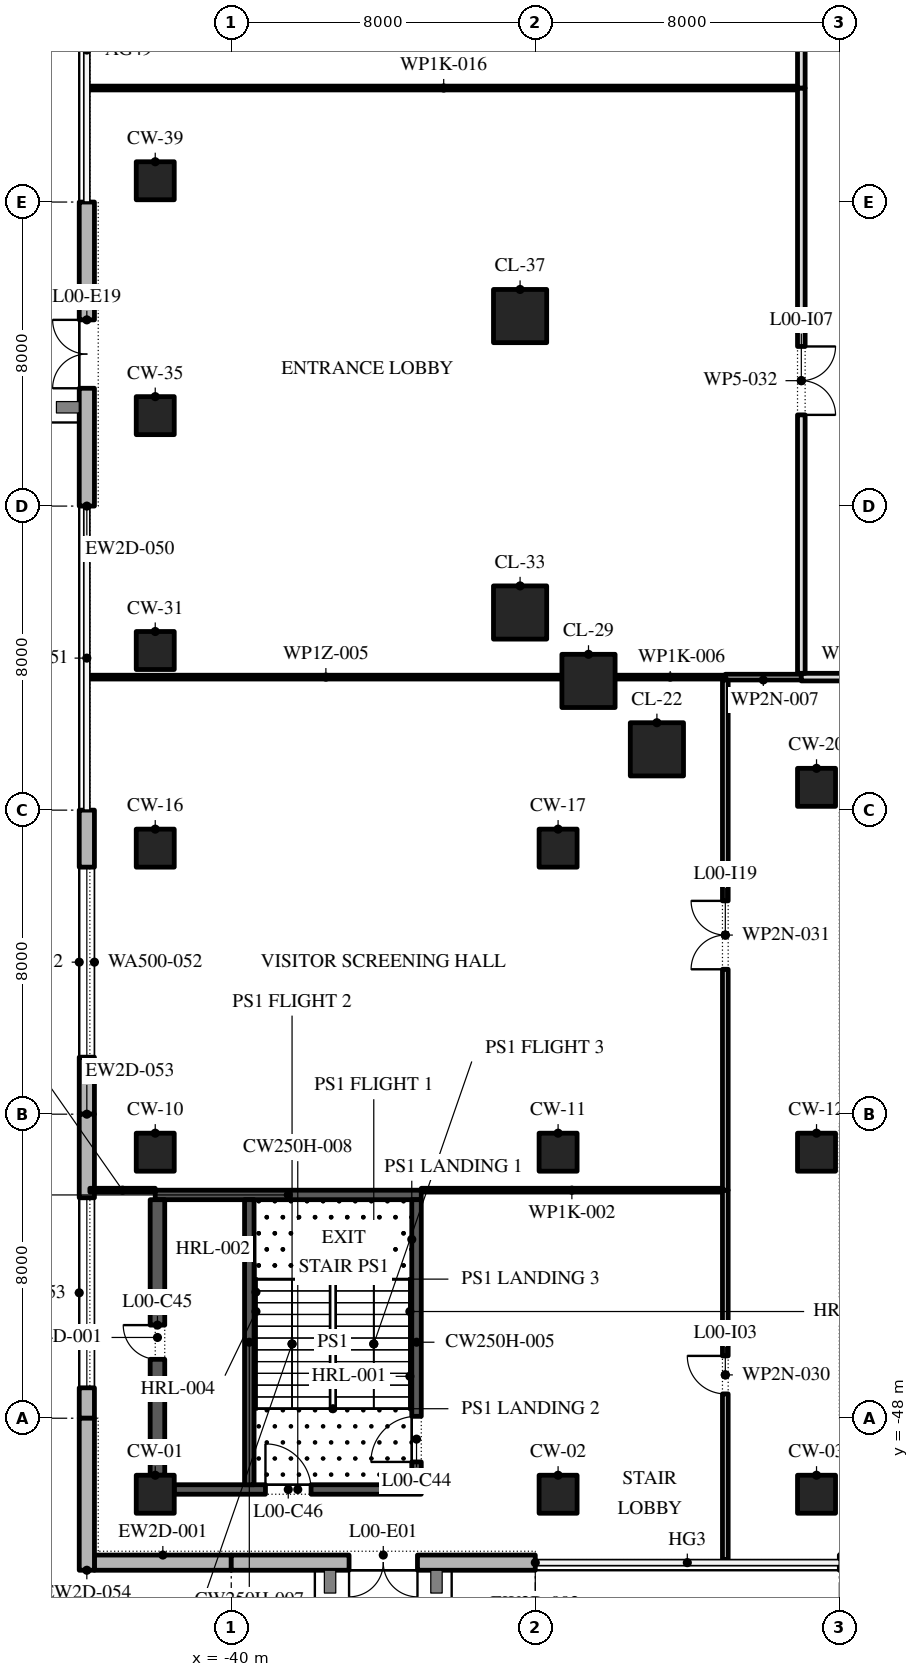
"""IFC4 building model, lengths in metres.
Left out: names, types, materials, properties, quantities, classifications, styles, units other than length and angle.
Written with IfcOpenShell. Run it as: python <this file> out.ifc"""

import sys

from ifc_helpers import new_model, si_unit, direction, frame, frame_2d, origin, origin_2d, place, context, subcontext, project, spatial, polyline, rectangle, outline, extrude, element, fill, save


model = new_model("IFC4")
c1 = context("Model", 3, precision=1e-05, world=origin(), true_north=direction((0.0, 1.0)))
c2 = subcontext(c1, "Body", "Model", "MODEL_VIEW")
j1 = project(units=[si_unit("LENGTHUNIT", "METRE"), si_unit("PLANEANGLEUNIT", "RADIAN")], contexts=[c1])
p1 = place(None, origin())
s1 = spatial("IfcSite", under=j1, at=p1, CompositionType="ELEMENT")
p2 = place(p1, origin())
s2 = spatial("IfcBuilding", under=s1, at=p2, CompositionType="ELEMENT")
p3 = place(p2, origin())
s3 = spatial("IfcBuildingStorey", under=s2, at=p3, CompositionType="ELEMENT", Elevation=0.0)
for number, where, z_axis, x_axis in (
    (1, (-42.0, -50.0, 0.0), (0.0, 0.0, 1.0), (1.0, 0.0, 0.0)),
    (2, (-31.4, -50.0, 0.0), (0.0, 0.0, 1.0), (1.0, 0.0, 0.0)),
    (3, (-24.6, -50.0, 0.0), (0.0, 0.0, 1.0), (1.0, 0.0, 0.0)),
    (4, (-42.0, -41.0, 0.0), (0.0, 0.0, 1.0), (1.0, 0.0, 0.0)),
    (5, (-31.4, -41.0, 0.0), (0.0, 0.0, 1.0), (1.0, 0.0, 0.0)),
    (6, (-24.6, -41.0, 0.0), (0.0, 0.0, 1.0), (1.0, 0.0, 0.0)),
    (7, (-42.0, -33.0, 0.0), (0.0, 0.0, 1.0), (1.0, 0.0, 0.0)),
    (8, (-31.4, -33.0, 0.0), (0.0, 0.0, 1.0), (1.0, 0.0, 0.0)),
    (9, (-24.6, -31.4, 0.0), (0.0, 0.0, 1.0), (1.0, 0.0, 0.0)),
):
    element("IfcColumn", number, at=place(p3, frame(where, z_axis=z_axis, x_axis=x_axis)), inside=s3, PredefinedType="COLUMN", context=c2, shape_type="SweptSolid", body=[
        extrude(rectangle(XDim=1.0, YDim=1.0, at=origin_2d()), origin(), (0.0, 0.0, 1.0), 8.0),
    ])
for number, where, z_axis, x_axis in (
    (10, (-28.8, -30.4, 0.0), (0.0, 0.0, 1.0), (1.0, 0.0, 0.0)),
    (11, (-30.6, -28.6, 0.0), (0.0, 0.0, 1.0), (1.0, 0.0, 0.0)),
):
    element("IfcColumn", number, at=place(p3, frame(where, z_axis=z_axis, x_axis=x_axis)), inside=s3, PredefinedType="COLUMN", context=c2, shape_type="SweptSolid", body=[
        extrude(rectangle(XDim=1.4, YDim=1.4, at=origin_2d()), origin(), (0.0, 0.0, 1.0), 8.0),
    ])
p4 = place(p3, frame((-42.0, -27.8, 0.0), z_axis=(0.0, 0.0, 1.0), x_axis=(1.0, 0.0, 0.0)))
e12 = element("IfcColumn", 12, at=p4, inside=s3, PredefinedType="COLUMN", context=c2, shape_type="SweptSolid", body=[
    extrude(rectangle(XDim=1.0, YDim=1.0, at=origin_2d()), origin(), (0.0, 0.0, 1.0), 8.0),
])
p5 = place(p3, frame((-32.4, -26.8, 0.0), z_axis=(0.0, 0.0, 1.0), x_axis=(1.0, 0.0, 0.0)))
e13 = element("IfcColumn", 13, at=p5, inside=s3, PredefinedType="COLUMN", context=c2, shape_type="SweptSolid", body=[
    extrude(rectangle(XDim=1.4, YDim=1.4, at=origin_2d()), origin(), (0.0, 0.0, 1.0), 8.0),
])
p6 = place(p3, frame((-42.0, -21.62, 0.0), z_axis=(0.0, 0.0, 1.0), x_axis=(1.0, 0.0, 0.0)))
e14 = element("IfcColumn", 14, at=p6, inside=s3, PredefinedType="COLUMN", context=c2, shape_type="SweptSolid", body=[
    extrude(rectangle(XDim=1.0, YDim=1.0, at=origin_2d()), origin(), (0.0, 0.0, 1.0), 8.0),
])
p7 = place(p3, frame((-32.4, -19.0, 0.0), z_axis=(0.0, 0.0, 1.0), x_axis=(1.0, 0.0, 0.0)))
e15 = element("IfcColumn", 15, at=p7, inside=s3, PredefinedType="COLUMN", context=c2, shape_type="SweptSolid", body=[
    extrude(rectangle(XDim=1.4, YDim=1.4, at=origin_2d()), origin(), (0.0, 0.0, 1.0), 8.0),
])
p8 = place(p3, frame((-42.0, -15.44, 0.0), z_axis=(0.0, 0.0, 1.0), x_axis=(1.0, 0.0, 0.0)))
e16 = element("IfcColumn", 16, at=p8, inside=s3, PredefinedType="COLUMN", context=c2, shape_type="SweptSolid", body=[
    extrude(rectangle(XDim=1.0, YDim=1.0, at=origin_2d()), origin(), (0.0, 0.0, 1.0), 8.0),
])
p9 = place(p3, frame((-43.6, -51.8, 0.0), z_axis=(0.0, 0.0, 1.0), x_axis=(1.0, 0.0, 0.0)))
e17 = element("IfcWall", 17, at=p9, inside=s3, PredefinedType="STANDARD", context=c2, shape_type="SweptSolid", body=[
    extrude(rectangle(XDim=3.6, YDim=0.4, at=frame_2d((1.8, 0.0))), origin(), (0.0, 0.0, 1.0), 7.7),
])
p10 = place(p3, frame((-40.0, -51.8, 0.0), z_axis=(0.0, 0.0, 1.0), x_axis=(1.0, 0.0, 0.0)))
e18 = element("IfcWall", 18, at=p10, inside=s3, PredefinedType="STANDARD", context=c2, shape_type="SweptSolid", body=[
    extrude(rectangle(XDim=8.0, YDim=0.4, at=frame_2d((4.0, 0.0))), origin(), (0.0, 0.0, 1.0), 7.7),
])
p11 = place(p10, frame((3.1, 0.0, 0.0)))
e19 = element("IfcOpeningElement", 19, at=p11, cuts=e18, PredefinedType="OPENING", context=c2, shape_type="SweptSolid", body=[
    extrude(rectangle(XDim=1.8, YDim=2.7, at=frame_2d((0.9, 1.35))), frame((0.0, 0.21, 0.0), z_axis=(0.0, -1.0, 0.0), x_axis=(1.0, 0.0, 0.0)), (0.0, 0.0, 1.0), 0.42),
])
p12 = place(p3, frame((-43.8, -16.0, 0.0), z_axis=(0.0, 0.0, 1.0), x_axis=(0.0, -1.0, 0.0)))
e20 = element("IfcWall", 20, at=p12, inside=s3, PredefinedType="STANDARD", context=c2, shape_type="SweptSolid", body=[
    extrude(rectangle(XDim=8.0, YDim=0.4, at=frame_2d((4.0, 0.0))), origin(), (0.0, 0.0, 1.0), 7.7),
])
p13 = place(p12, frame((3.1, 0.0, 0.0)))
e21 = element("IfcOpeningElement", 21, at=p13, cuts=e20, PredefinedType="OPENING", context=c2, shape_type="SweptSolid", body=[
    extrude(rectangle(XDim=1.8, YDim=2.7, at=frame_2d((0.9, 1.35))), frame((0.0, 0.21, 0.0), z_axis=(0.0, -1.0, 0.0), x_axis=(1.0, 0.0, 0.0)), (0.0, 0.0, 1.0), 0.42),
])
p14 = place(p3, frame((-43.8, -32.0, 0.0), z_axis=(0.0, 0.0, 1.0), x_axis=(0.0, -1.0, 0.0)))
e22 = element("IfcWall", 22, at=p14, inside=s3, PredefinedType="STANDARD", context=c2, shape_type="SweptSolid", body=[
    extrude(rectangle(XDim=8.0, YDim=0.4, at=frame_2d((4.0, 0.0))), origin(), (0.0, 0.0, 1.0), 7.7),
])
p15 = place(p14, frame((1.5, 0.0, 0.5)))
e23 = element("IfcOpeningElement", 23, at=p15, cuts=e22, PredefinedType="OPENING", context=c2, shape_type="SweptSolid", body=[
    extrude(outline(polyline([(0.0, 0.0), (5.0, 0.0), (5.0, 3.35), (4.955, 3.907), (4.822, 4.451), (4.604, 4.966), (4.306, 5.44), (3.937, 5.86), (3.505, 6.216), (3.022, 6.498), (2.5, 6.7), (1.978, 6.498), (1.495, 6.216), (1.063, 5.86), (0.694, 5.44), (0.396, 4.966), (0.178, 4.451), (0.045, 3.907), (0.0, 3.35), (0.0, 0.0)])), frame((0.0, 0.21, 0.0), z_axis=(0.0, -1.0, 0.0), x_axis=(1.0, 0.0, 0.0)), (0.0, 0.0, 1.0), 0.42),
])
p16 = place(p3, frame((-43.8, -40.0, 0.0), z_axis=(0.0, 0.0, 1.0), x_axis=(0.0, -1.0, 0.0)))
e24 = element("IfcWall", 24, at=p16, inside=s3, PredefinedType="STANDARD", context=c2, shape_type="SweptSolid", body=[
    extrude(rectangle(XDim=8.0, YDim=0.4, at=frame_2d((4.0, 0.0))), origin(), (0.0, 0.0, 1.0), 7.7),
])
p17 = place(p16, frame((2.2, 0.0, 0.5)))
e25 = element("IfcOpeningElement", 25, at=p17, cuts=e24, PredefinedType="OPENING", context=c2, shape_type="SweptSolid", body=[
    extrude(outline(polyline([(0.0, 0.0), (5.0, 0.0), (5.0, 3.35), (4.955, 3.907), (4.822, 4.451), (4.604, 4.966), (4.306, 5.44), (3.937, 5.86), (3.505, 6.216), (3.022, 6.498), (2.5, 6.7), (1.978, 6.498), (1.495, 6.216), (1.063, 5.86), (0.694, 5.44), (0.396, 4.966), (0.178, 4.451), (0.045, 3.907), (0.0, 3.35), (0.0, 0.0)])), frame((0.0, 0.21, 0.0), z_axis=(0.0, -1.0, 0.0), x_axis=(1.0, 0.0, 0.0)), (0.0, 0.0, 1.0), 0.42),
])
p18 = place(p3, frame((-43.8, -48.0, 0.0), z_axis=(0.0, 0.0, 1.0), x_axis=(0.0, -1.0, 0.0)))
e26 = element("IfcWall", 26, at=p18, inside=s3, PredefinedType="STANDARD", context=c2, shape_type="SweptSolid", body=[
    extrude(rectangle(XDim=4.0, YDim=0.4, at=frame_2d((2.0, 0.0))), origin(), (0.0, 0.0, 1.0), 7.7),
])
p19 = place(p3, frame((-41.5, -49.875, 0.0), z_axis=(0.0, 0.0, 1.0), x_axis=(1.0, 0.0, 0.0)))
e27 = element("IfcWall", 27, at=p19, inside=s3, PredefinedType="SHEAR", context=c2, shape_type="SweptSolid", body=[
    extrude(rectangle(XDim=6.5, YDim=0.25, at=frame_2d((3.25, 0.0))), origin(), (0.0, 0.0, 1.0), 7.7),
])
p20 = place(p19, frame((2.4, 0.0, 0.0)))
e28 = element("IfcOpeningElement", 28, at=p20, cuts=e27, PredefinedType="OPENING", context=c2, shape_type="SweptSolid", body=[
    extrude(rectangle(XDim=1.2, YDim=2.1, at=frame_2d((0.6, 1.05))), frame((0.0, 0.135, 0.0), z_axis=(0.0, -1.0, 0.0), x_axis=(1.0, 0.0, 0.0)), (0.0, 0.0, 1.0), 0.27),
])
p21 = place(p3, frame((-42.0, -42.125, 0.0), z_axis=(0.0, 0.0, 1.0), x_axis=(1.0, 0.0, 0.0)))
e29 = element("IfcWall", 29, at=p21, inside=s3, PredefinedType="SHEAR", context=c2, shape_type="SweptSolid", body=[
    extrude(rectangle(XDim=7.0, YDim=0.25, at=frame_2d((3.5, 0.0))), origin(), (0.0, 0.0, 1.0), 7.7),
])
p22 = place(p3, frame((-41.942, -49.5, 0.0), z_axis=(0.0, 0.0, 1.0), x_axis=(0.0, 1.0, 0.0)))
e30 = element("IfcWall", 30, at=p22, inside=s3, PredefinedType="SHEAR", context=c2, shape_type="SweptSolid", body=[
    extrude(rectangle(XDim=7.25, YDim=0.384, at=frame_2d((3.625, 0.0))), origin(), (0.0, 0.0, 1.0), 7.7),
])
p23 = place(p22, frame((3.05, 0.0, 0.0)))
e31 = element("IfcOpeningElement", 31, at=p23, cuts=e30, PredefinedType="OPENING", context=c2, shape_type="SweptSolid", body=[
    extrude(rectangle(XDim=0.9, YDim=2.1, at=frame_2d((0.45, 1.05))), frame((0.0, 0.202, 0.0), z_axis=(0.0, -1.0, 0.0), x_axis=(1.0, 0.0, 0.0)), (0.0, 0.0, 1.0), 0.404),
])
p24 = place(p3, frame((-35.125, -49.75, 0.0), z_axis=(0.0, 0.0, 1.0), x_axis=(0.0, 1.0, 0.0)))
e32 = element("IfcWall", 32, at=p24, inside=s3, PredefinedType="SHEAR", context=c2, shape_type="SweptSolid", body=[
    extrude(rectangle(XDim=7.5, YDim=0.25, at=frame_2d((3.75, 0.0))), origin(), (0.0, 0.0, 1.0), 7.7),
])
p25 = place(p24, frame((0.6, 0.0, 0.0)))
e33 = element("IfcOpeningElement", 33, at=p25, cuts=e32, PredefinedType="OPENING", context=c2, shape_type="SweptSolid", body=[
    extrude(rectangle(XDim=1.2, YDim=2.1, at=frame_2d((0.6, 1.05))), frame((0.0, 0.135, 0.0), z_axis=(0.0, -1.0, 0.0), x_axis=(1.0, 0.0, 0.0)), (0.0, 0.0, 1.0), 0.27),
])
p26 = place(p3, frame((-39.525, -49.75, 0.0), z_axis=(0.0, 0.0, 1.0), x_axis=(0.0, 1.0, 0.0)))
e34 = element("IfcWall", 34, at=p26, inside=s3, PredefinedType="SHEAR", context=c2, shape_type="SweptSolid", body=[
    extrude(rectangle(XDim=7.5, YDim=0.25, at=frame_2d((3.75, 0.0))), origin(), (0.0, 0.0, 1.0), 7.7),
])
p27 = place(p3, frame((-43.72, -42.0, 0.0), z_axis=(0.0, 0.0, 1.0), x_axis=(1.0, 0.0, 0.0)))
e35 = element("IfcWall", 35, at=p27, inside=s3, PredefinedType="PARTITIONING", context=c2, shape_type="SweptSolid", body=[
    extrude(rectangle(XDim=1.72, YDim=0.1, at=frame_2d((0.86, 0.0))), origin(), (0.0, 0.0, 1.0), 7.7),
])
p28 = place(p3, frame((-35.0, -42.0, 0.0), z_axis=(0.0, 0.0, 1.0), x_axis=(1.0, 0.0, 0.0)))
e36 = element("IfcWall", 36, at=p28, inside=s3, PredefinedType="PARTITIONING", context=c2, shape_type="SweptSolid", body=[
    extrude(rectangle(XDim=7.925, YDim=0.1, at=frame_2d((3.962, 0.0))), origin(), (0.0, 0.0, 1.0), 7.7),
])
p29 = place(p3, frame((-43.72, -28.5, 0.0), z_axis=(0.0, 0.0, 1.0), x_axis=(1.0, 0.0, 0.0)))
e37 = element("IfcWall", 37, at=p29, inside=s3, PredefinedType="PARTITIONING", context=c2, shape_type="SweptSolid", body=[
    extrude(rectangle(XDim=12.42, YDim=0.1, at=frame_2d((6.21, 0.0))), origin(), (0.0, 0.0, 1.0), 7.164),
])
p30 = place(p3, frame((-29.9, -28.5, 0.0), z_axis=(0.0, 0.0, 1.0), x_axis=(1.0, 0.0, 0.0)))
e38 = element("IfcWall", 38, at=p30, inside=s3, PredefinedType="PARTITIONING", context=c2, shape_type="SweptSolid", body=[
    extrude(rectangle(XDim=2.9, YDim=0.1, at=frame_2d((1.45, 0.0))), origin(), (0.0, 0.0, 1.0), 7.7),
])
p31 = place(p3, frame((-27.0, -28.5, 0.0), z_axis=(0.0, 0.0, 1.0), x_axis=(1.0, 0.0, 0.0)))
e39 = element("IfcWall", 39, at=p31, inside=s3, PredefinedType="PARTITIONING", context=c2, shape_type="SweptSolid", body=[
    extrude(rectangle(XDim=2.0, YDim=0.15, at=frame_2d((1.0, 0.0))), origin(), (0.0, 0.0, 1.0), 7.7),
])
p32 = place(p3, frame((-25.0, -28.5, 0.0), z_axis=(0.0, 0.0, 1.0), x_axis=(1.0, 0.0, 0.0)))
e40 = element("IfcWall", 40, at=p32, inside=s3, PredefinedType="PARTITIONING", context=c2, shape_type="SweptSolid", body=[
    extrude(rectangle(XDim=3.0, YDim=0.2, at=frame_2d((1.5, 0.0))), origin(), (0.0, 0.0, 1.0), 7.7),
])
p33 = place(p3, frame((-43.72, -13.0, 0.0), z_axis=(0.0, 0.0, 1.0), x_axis=(1.0, 0.0, 0.0)))
e41 = element("IfcWall", 41, at=p33, inside=s3, PredefinedType="PARTITIONING", context=c2, shape_type="SweptSolid", body=[
    extrude(rectangle(XDim=18.62, YDim=0.1, at=frame_2d((9.31, 0.0))), origin(), (0.0, 0.0, 1.0), 7.7),
])
p34 = place(p3, frame((-27.0, -51.72, 0.0), z_axis=(0.0, 0.0, 1.0), x_axis=(0.0, 1.0, 0.0)))
e42 = element("IfcWall", 42, at=p34, inside=s3, PredefinedType="PARTITIONING", context=c2, shape_type="SweptSolid", body=[
    extrude(rectangle(XDim=9.72, YDim=0.15, at=frame_2d((4.86, 0.0))), origin(), (0.0, 0.0, 1.0), 7.7),
])
p35 = place(p34, frame((4.36, 0.0, 0.0)))
e43 = element("IfcOpeningElement", 43, at=p35, cuts=e42, PredefinedType="OPENING", context=c2, shape_type="SweptSolid", body=[
    extrude(rectangle(XDim=1.0, YDim=2.1, at=frame_2d((0.5, 1.05))), frame((0.0, 0.085, 0.0), z_axis=(0.0, -1.0, 0.0), x_axis=(1.0, 0.0, 0.0)), (0.0, 0.0, 1.0), 0.17),
])
p36 = place(p3, frame((-27.0, -42.0, 0.0), z_axis=(0.0, 0.0, 1.0), x_axis=(0.0, 1.0, 0.0)))
e44 = element("IfcWall", 44, at=p36, inside=s3, PredefinedType="PARTITIONING", context=c2, shape_type="SweptSolid", body=[
    extrude(rectangle(XDim=13.425, YDim=0.15, at=frame_2d((6.712, 0.0))), origin(), (0.0, 0.0, 1.0), 7.7),
])
p37 = place(p36, frame((5.812, 0.0, 0.0)))
e45 = element("IfcOpeningElement", 45, at=p37, cuts=e44, PredefinedType="OPENING", context=c2, shape_type="SweptSolid", body=[
    extrude(rectangle(XDim=1.8, YDim=2.1, at=frame_2d((0.9, 1.05))), frame((0.0, 0.085, 0.0), z_axis=(0.0, -1.0, 0.0), x_axis=(1.0, 0.0, 0.0)), (0.0, 0.0, 1.0), 0.17),
])
p38 = place(p3, frame((-25.0, -28.4, 0.0), z_axis=(0.0, 0.0, 1.0), x_axis=(0.0, 1.0, 0.0)))
e46 = element("IfcWall", 46, at=p38, inside=s3, PredefinedType="PARTITIONING", context=c2, shape_type="SweptSolid", body=[
    extrude(rectangle(XDim=15.4, YDim=0.2, at=frame_2d((7.7, 0.0))), origin(), (0.0, 0.0, 1.0), 7.7),
])
p39 = place(p38, frame((6.8, 0.0, 0.0)))
e47 = element("IfcOpeningElement", 47, at=p39, cuts=e46, PredefinedType="OPENING", context=c2, shape_type="SweptSolid", body=[
    extrude(rectangle(XDim=1.8, YDim=2.1, at=frame_2d((0.9, 1.05))), frame((0.0, 0.11, 0.0), z_axis=(0.0, -1.0, 0.0), x_axis=(1.0, 0.0, 0.0)), (0.0, 0.0, 1.0), 0.22),
])
p40 = place(p3, frame((-25.0, -13.0, 0.0), z_axis=(0.0, 0.0, 1.0), x_axis=(0.0, 1.0, 0.0)))
e48 = element("IfcWall", 48, at=p40, inside=s3, PredefinedType="PARTITIONING", context=c2, shape_type="SweptSolid", body=[
    extrude(rectangle(XDim=9.5, YDim=0.2, at=frame_2d((4.75, 0.0))), origin(), (0.0, 0.0, 1.0), 7.7),
])
p41 = place(p40, frame((3.85, 0.0, 0.0)))
e49 = element("IfcOpeningElement", 49, at=p41, cuts=e48, PredefinedType="OPENING", context=c2, shape_type="SweptSolid", body=[
    extrude(rectangle(XDim=1.8, YDim=2.1, at=frame_2d((0.9, 1.05))), frame((0.0, 0.11, 0.0), z_axis=(0.0, -1.0, 0.0), x_axis=(1.0, 0.0, 0.0)), (0.0, 0.0, 1.0), 0.22),
])
p42 = place(p11, frame((1.8, 0.0, 0.0), z_axis=(0.0, 0.0, 1.0), x_axis=(-1.0, 0.0, 0.0)))
e50 = element("IfcDoor", 50, at=p42, inside=s3, OperationType="DOUBLE_DOOR_SINGLE_SWING", PredefinedType="DOOR", context=c2, shape_type="SweptSolid", body=[
    extrude(rectangle(XDim=1.8, YDim=2.7, at=frame_2d((0.9, 1.35))), frame((0.0, 0.025, 0.0), z_axis=(0.0, -1.0, 0.0), x_axis=(1.0, 0.0, 0.0)), (0.0, 0.0, 1.0), 0.05),
])
fill(e19, e50)
p43 = place(p13, frame((1.8, 0.0, 0.0), z_axis=(0.0, 0.0, 1.0), x_axis=(-1.0, 0.0, 0.0)))
e51 = element("IfcDoor", 51, at=p43, inside=s3, OperationType="DOUBLE_DOOR_SINGLE_SWING", PredefinedType="DOOR", context=c2, shape_type="SweptSolid", body=[
    extrude(rectangle(XDim=1.8, YDim=2.7, at=frame_2d((0.9, 1.35))), frame((0.0, 0.025, 0.0), z_axis=(0.0, -1.0, 0.0), x_axis=(1.0, 0.0, 0.0)), (0.0, 0.0, 1.0), 0.05),
])
fill(e21, e51)
p44 = place(p15, origin())
e52 = element("IfcWindow", 52, at=p44, inside=s3, PartitioningType="DOUBLE_PANEL_VERTICAL", PredefinedType="WINDOW", context=c2, shape_type="SweptSolid", body=[
    extrude(outline(polyline([(0.0, 0.0), (5.0, 0.0), (5.0, 3.35), (4.955, 3.907), (4.822, 4.451), (4.604, 4.966), (4.306, 5.44), (3.937, 5.86), (3.505, 6.216), (3.022, 6.498), (2.5, 6.7), (1.978, 6.498), (1.495, 6.216), (1.063, 5.86), (0.694, 5.44), (0.396, 4.966), (0.178, 4.451), (0.045, 3.907), (0.0, 3.35), (0.0, 0.0)])), frame((0.0, 0.03, 0.0), z_axis=(0.0, -1.0, 0.0), x_axis=(1.0, 0.0, 0.0)), (0.0, 0.0, 1.0), 0.06),
])
fill(e23, e52)
p45 = place(p17, origin())
e53 = element("IfcWindow", 53, at=p45, inside=s3, PartitioningType="DOUBLE_PANEL_VERTICAL", PredefinedType="WINDOW", context=c2, shape_type="SweptSolid", body=[
    extrude(outline(polyline([(0.0, 0.0), (5.0, 0.0), (5.0, 3.35), (4.955, 3.907), (4.822, 4.451), (4.604, 4.966), (4.306, 5.44), (3.937, 5.86), (3.505, 6.216), (3.022, 6.498), (2.5, 6.7), (1.978, 6.498), (1.495, 6.216), (1.063, 5.86), (0.694, 5.44), (0.396, 4.966), (0.178, 4.451), (0.045, 3.907), (0.0, 3.35), (0.0, 0.0)])), frame((0.0, 0.03, 0.0), z_axis=(0.0, -1.0, 0.0), x_axis=(1.0, 0.0, 0.0)), (0.0, 0.0, 1.0), 0.06),
])
fill(e25, e53)
p46 = place(p25, origin())
e54 = element("IfcDoor", 54, at=p46, inside=s3, OperationType="SINGLE_SWING_RIGHT", PredefinedType="DOOR", context=c2, shape_type="SweptSolid", body=[
    extrude(rectangle(XDim=1.2, YDim=2.1, at=frame_2d((0.6, 1.05))), frame((0.0, 0.025, 0.0), z_axis=(0.0, -1.0, 0.0), x_axis=(1.0, 0.0, 0.0)), (0.0, 0.0, 1.0), 0.05),
])
fill(e33, e54)
p47 = place(p23, origin())
e55 = element("IfcDoor", 55, at=p47, inside=s3, OperationType="SINGLE_SWING_LEFT", PredefinedType="DOOR", context=c2, shape_type="SweptSolid", body=[
    extrude(rectangle(XDim=0.9, YDim=2.1, at=frame_2d((0.45, 1.05))), frame((0.0, -0.142, 0.0), z_axis=(0.0, -1.0, 0.0), x_axis=(1.0, 0.0, 0.0)), (0.0, 0.0, 1.0), 0.05),
])
fill(e31, e55)
p48 = place(p20, origin())
e56 = element("IfcDoor", 56, at=p48, inside=s3, OperationType="SINGLE_SWING_RIGHT", PredefinedType="DOOR", context=c2, shape_type="SweptSolid", body=[
    extrude(rectangle(XDim=1.2, YDim=2.1, at=frame_2d((0.6, 1.05))), frame((0.0, 0.025, 0.0), z_axis=(0.0, -1.0, 0.0), x_axis=(1.0, 0.0, 0.0)), (0.0, 0.0, 1.0), 0.05),
])
fill(e28, e56)
p49 = place(p35, origin())
e57 = element("IfcDoor", 57, at=p49, inside=s3, OperationType="SINGLE_SWING_LEFT", PredefinedType="DOOR", context=c2, shape_type="SweptSolid", body=[
    extrude(rectangle(XDim=1.0, YDim=2.1, at=frame_2d((0.5, 1.05))), frame((0.0, 0.025, 0.0), z_axis=(0.0, -1.0, 0.0), x_axis=(1.0, 0.0, 0.0)), (0.0, 0.0, 1.0), 0.05),
])
fill(e43, e57)
p50 = place(p39, frame((1.8, 0.0, 0.0), z_axis=(0.0, 0.0, 1.0), x_axis=(-1.0, 0.0, 0.0)))
e58 = element("IfcDoor", 58, at=p50, inside=s3, OperationType="SINGLE_SWING_LEFT", PredefinedType="DOOR", context=c2, shape_type="SweptSolid", body=[
    extrude(rectangle(XDim=1.8, YDim=2.1, at=frame_2d((0.9, 1.05))), frame((0.0, 0.025, 0.0), z_axis=(0.0, -1.0, 0.0), x_axis=(1.0, 0.0, 0.0)), (0.0, 0.0, 1.0), 0.05),
])
fill(e47, e58)
p51 = place(p37, origin())
e59 = element("IfcDoor", 59, at=p51, inside=s3, OperationType="SINGLE_SWING_RIGHT", PredefinedType="DOOR", context=c2, shape_type="SweptSolid", body=[
    extrude(rectangle(XDim=1.8, YDim=2.1, at=frame_2d((0.9, 1.05))), frame((0.0, 0.025, 0.0), z_axis=(0.0, -1.0, 0.0), x_axis=(1.0, 0.0, 0.0)), (0.0, 0.0, 1.0), 0.05),
])
fill(e45, e59)
save(model, sys.argv[1])
